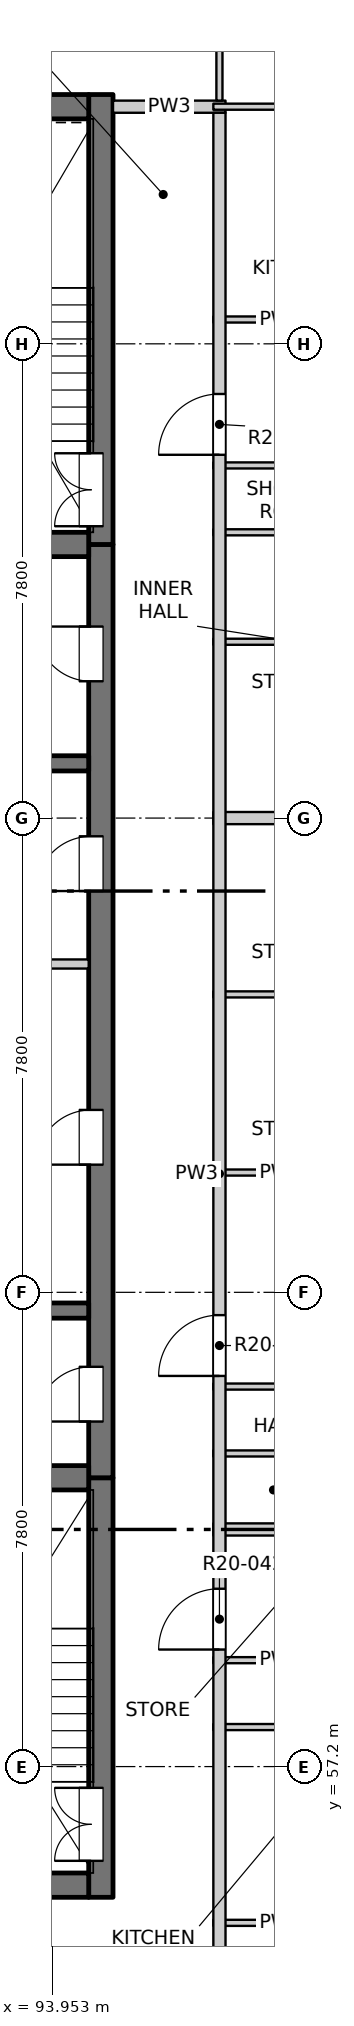
"""IFC4 building model, lengths in metres.
Left out: names, types, materials, properties, quantities, classifications, styles, units other than length and angle.
Written with IfcOpenShell. Run it as: python <this file> out.ifc"""

import sys

from ifc_helpers import new_model, si_unit, direction, frame, frame_2d, origin, place, context, subcontext, project, spatial, rectangle, extrude, element, fill, save


model = new_model("IFC4")
c1 = context("Model", 3, precision=1e-05, world=origin(), true_north=direction((0.0, 1.0)))
c2 = subcontext(c1, "Body", "Model", "MODEL_VIEW")
j1 = project(units=[si_unit("LENGTHUNIT", "METRE"), si_unit("PLANEANGLEUNIT", "RADIAN")], contexts=[c1])
p1 = place(None, origin())
s1 = spatial("IfcSite", under=j1, at=p1, CompositionType="ELEMENT")
p2 = place(p1, origin())
s2 = spatial("IfcBuilding", under=s1, at=p2, CompositionType="ELEMENT")
p3 = place(p2, frame((0.0, 0.0, 210.9)))
s3 = spatial("IfcBuildingStorey", under=s2, at=p3, CompositionType="ELEMENT", Elevation=210.9)
p4 = place(p3, frame((94.75, 55.05, -0.25), z_axis=(0.0, 0.0, 1.0), x_axis=(0.0, 1.0, 0.0)))
e1 = element("IfcWall", 1, at=p4, inside=s3, PredefinedType="SOLIDWALL", context=c2, shape_type="SweptSolid", body=[
    extrude(rectangle(XDim=6.9, YDim=0.4, at=frame_2d((3.45, 0.0))), origin(), (0.0, 0.0, 1.0), 3.4),
])
p5 = place(p4, frame((0.6, 0.0, 0.25)))
e2 = element("IfcOpeningElement", 2, at=p5, cuts=e1, PredefinedType="OPENING", context=c2, shape_type="SweptSolid", body=[
    extrude(rectangle(XDim=1.2, YDim=2.1, at=frame_2d((0.6, 1.05))), frame((0.0, 0.21, 0.0), z_axis=(0.0, -1.0, 0.0), x_axis=(1.0, 0.0, 0.0)), (0.0, 0.0, 1.0), 0.42),
])
p6 = place(p3, frame((94.75, 61.95, -0.25), z_axis=(0.0, 0.0, 1.0), x_axis=(0.0, 1.0, 0.0)))
e3 = element("IfcWall", 3, at=p6, inside=s3, PredefinedType="SOLIDWALL", context=c2, shape_type="SweptSolid", body=[
    extrude(rectangle(XDim=15.35, YDim=0.4, at=frame_2d((7.675, 0.0))), origin(), (0.0, 0.0, 1.0), 3.4),
])
p7 = place(p6, frame((0.925, 0.0, 0.25)))
e4 = element("IfcOpeningElement", 4, at=p7, cuts=e3, PredefinedType="OPENING", context=c2, shape_type="SweptSolid", body=[
    extrude(rectangle(XDim=0.9, YDim=2.1, at=frame_2d((0.45, 1.05))), frame((0.0, 0.21, 0.0), z_axis=(0.0, -1.0, 0.0), x_axis=(1.0, 0.0, 0.0)), (0.0, 0.0, 1.0), 0.42),
])
p8 = place(p6, frame((5.15, 0.0, 0.25)))
e5 = element("IfcOpeningElement", 5, at=p8, cuts=e3, PredefinedType="OPENING", context=c2, shape_type="SweptSolid", body=[
    extrude(rectangle(XDim=0.9, YDim=2.1, at=frame_2d((0.45, 1.05))), frame((0.0, 0.21, 0.0), z_axis=(0.0, -1.0, 0.0), x_axis=(1.0, 0.0, 0.0)), (0.0, 0.0, 1.0), 0.42),
])
p9 = place(p6, frame((9.65, 0.0, 0.25)))
e6 = element("IfcOpeningElement", 6, at=p9, cuts=e3, PredefinedType="OPENING", context=c2, shape_type="SweptSolid", body=[
    extrude(rectangle(XDim=0.9, YDim=2.1, at=frame_2d((0.45, 1.05))), frame((0.0, 0.21, 0.0), z_axis=(0.0, -1.0, 0.0), x_axis=(1.0, 0.0, 0.0)), (0.0, 0.0, 1.0), 0.42),
])
p10 = place(p6, frame((13.1, 0.0, 0.25)))
e7 = element("IfcOpeningElement", 7, at=p10, cuts=e3, PredefinedType="OPENING", context=c2, shape_type="SweptSolid", body=[
    extrude(rectangle(XDim=0.9, YDim=2.1, at=frame_2d((0.45, 1.05))), frame((0.0, 0.21, 0.0), z_axis=(0.0, -1.0, 0.0), x_axis=(1.0, 0.0, 0.0)), (0.0, 0.0, 1.0), 0.42),
])
p11 = place(p3, frame((94.75, 77.3, -0.25), z_axis=(0.0, 0.0, 1.0), x_axis=(0.0, 1.0, 0.0)))
e8 = element("IfcWall", 8, at=p11, inside=s3, PredefinedType="SOLIDWALL", context=c2, shape_type="SweptSolid", body=[
    extrude(rectangle(XDim=7.4, YDim=0.4, at=frame_2d((3.7, 0.0))), origin(), (0.0, 0.0, 1.0), 3.4),
])
p12 = place(p11, frame((0.3, 0.0, 0.25)))
e9 = element("IfcOpeningElement", 9, at=p12, cuts=e8, PredefinedType="OPENING", context=c2, shape_type="SweptSolid", body=[
    extrude(rectangle(XDim=1.2, YDim=2.1, at=frame_2d((0.6, 1.05))), frame((0.0, 0.21, 0.0), z_axis=(0.0, -1.0, 0.0), x_axis=(1.0, 0.0, 0.0)), (0.0, 0.0, 1.0), 0.42),
])
p13 = place(p3, frame((75.45, 55.25, -0.25), z_axis=(0.0, 0.0, 1.0), x_axis=(1.0, 0.0, 0.0)))
e10 = element("IfcWall", 10, at=p13, inside=s3, PredefinedType="SOLIDWALL", context=c2, shape_type="SweptSolid", body=[
    extrude(rectangle(XDim=19.1, YDim=0.4, at=frame_2d((9.55, 0.0))), origin(), (0.0, 0.0, 1.0), 3.4),
])
p14 = place(p13, frame((8.8, 0.0, 0.25)))
e11 = element("IfcOpeningElement", 11, at=p14, cuts=e10, PredefinedType="OPENING", context=c2, shape_type="SweptSolid", body=[
    extrude(rectangle(XDim=1.5, YDim=2.1, at=frame_2d((0.75, 1.05))), frame((0.0, 0.21, 0.0), z_axis=(0.0, -1.0, 0.0), x_axis=(1.0, 0.0, 0.0)), (0.0, 0.0, 1.0), 0.42),
])
p15 = place(p3, frame((75.45, 84.5, -0.25), z_axis=(0.0, 0.0, 1.0), x_axis=(1.0, 0.0, 0.0)))
e12 = element("IfcWall", 12, at=p15, inside=s3, PredefinedType="SOLIDWALL", context=c2, shape_type="SweptSolid", body=[
    extrude(rectangle(XDim=19.1, YDim=0.4, at=frame_2d((9.55, 0.0))), origin(), (0.0, 0.0, 1.0), 3.4),
])
p16 = place(p3, frame((90.675, 61.95, -0.25), z_axis=(0.0, 0.0, 1.0), x_axis=(1.0, 0.0, 0.0)))
e13 = element("IfcWall", 13, at=p16, inside=s3, PredefinedType="SOLIDWALL", context=c2, shape_type="SweptSolid", body=[
    extrude(rectangle(XDim=3.875, YDim=0.4, at=frame_2d((1.938, 0.0))), origin(), (0.0, 0.0, 1.0), 3.4),
])
for number, where, z_axis, x_axis in (
    (14, (90.675, 64.7, -0.25), (0.0, 0.0, 1.0), (1.0, 0.0, 0.0)),
    (15, (90.675, 73.7, -0.25), (0.0, 0.0, 1.0), (1.0, 0.0, 0.0)),
):
    element("IfcWall", number, at=place(p3, frame(where, z_axis=z_axis, x_axis=x_axis)), inside=s3, PredefinedType="SOLIDWALL", context=c2, shape_type="SweptSolid", body=[
        extrude(rectangle(XDim=3.875, YDim=0.25, at=frame_2d((1.938, 0.0))), origin(), (0.0, 0.0, 1.0), 3.4),
    ])
p17 = place(p3, frame((90.675, 77.3, -0.25), z_axis=(0.0, 0.0, 1.0), x_axis=(1.0, 0.0, 0.0)))
e16 = element("IfcWall", 16, at=p17, inside=s3, PredefinedType="SOLIDWALL", context=c2, shape_type="SweptSolid", body=[
    extrude(rectangle(XDim=3.875, YDim=0.4, at=frame_2d((1.938, 0.0))), origin(), (0.0, 0.0, 1.0), 3.4),
])
for number, where, z_axis, x_axis in (
    (17, (96.6, 54.63, 0.0), (0.0, 0.0, 1.0), (1.0, 0.0, 0.0)),
    (18, (96.6, 57.85, 0.0), (0.0, 0.0, 1.0), (1.0, 0.0, 0.0)),
    (19, (96.6, 58.95, 0.0), (0.0, 0.0, 1.0), (1.0, 0.0, 0.0)),
):
    element("IfcWall", number, at=place(p3, frame(where, z_axis=z_axis, x_axis=x_axis)), inside=s3, PredefinedType="PARTITIONING", context=c2, shape_type="SweptSolid", body=[
        extrude(rectangle(XDim=2.22, YDim=0.1, at=frame_2d((1.11, 0.0))), origin(), (0.0, 0.0, 1.0), 3.15),
    ])
p18 = place(p3, frame((96.6, 61.1, 0.0), z_axis=(0.0, 0.0, 1.0), x_axis=(1.0, 0.0, 0.0)))
e20 = element("IfcWall", 20, at=p18, inside=s3, PredefinedType="PARTITIONING", context=c2, shape_type="SweptSolid", body=[
    extrude(rectangle(XDim=11.5, YDim=0.2, at=frame_2d((5.75, 0.0))), origin(), (0.0, 0.0, 1.0), 2.55),
])
for number, where, z_axis, x_axis in (
    (21, (96.6, 62.35, 0.0), (0.0, 0.0, 1.0), (1.0, 0.0, 0.0)),
    (22, (96.6, 63.45, 0.0), (0.0, 0.0, 1.0), (1.0, 0.0, 0.0)),
    (23, (96.6, 66.97, 0.0), (0.0, 0.0, 1.0), (1.0, 0.0, 0.0)),
    (24, (96.6, 69.9, 0.0), (0.0, 0.0, 1.0), (1.0, 0.0, 0.0)),
):
    element("IfcWall", number, at=place(p3, frame(where, z_axis=z_axis, x_axis=x_axis)), inside=s3, PredefinedType="PARTITIONING", context=c2, shape_type="SweptSolid", body=[
        extrude(rectangle(XDim=2.22, YDim=0.1, at=frame_2d((1.11, 0.0))), origin(), (0.0, 0.0, 1.0), 3.15),
    ])
p19 = place(p3, frame((90.675, 70.4, 0.0), z_axis=(0.0, 0.0, 1.0), x_axis=(1.0, 0.0, 0.0)))
e25 = element("IfcWall", 25, at=p19, inside=s3, PredefinedType="PARTITIONING", context=c2, shape_type="SweptSolid", body=[
    extrude(rectangle(XDim=3.875, YDim=0.15, at=frame_2d((1.938, 0.0))), origin(), (0.0, 0.0, 1.0), 3.15),
])
p20 = place(p3, frame((96.6, 72.8, 0.0), z_axis=(0.0, 0.0, 1.0), x_axis=(1.0, 0.0, 0.0)))
e26 = element("IfcWall", 26, at=p20, inside=s3, PredefinedType="PARTITIONING", context=c2, shape_type="SweptSolid", body=[
    extrude(rectangle(XDim=11.5, YDim=0.2, at=frame_2d((5.75, 0.0))), origin(), (0.0, 0.0, 1.0), 3.15),
])
for number, where, z_axis, x_axis in (
    (27, (96.6, 75.7, 0.0), (0.0, 0.0, 1.0), (1.0, 0.0, 0.0)),
    (28, (96.6, 77.5, 0.0), (0.0, 0.0, 1.0), (1.0, 0.0, 0.0)),
    (29, (96.6, 78.6, 0.0), (0.0, 0.0, 1.0), (1.0, 0.0, 0.0)),
    (30, (96.6, 81.0, 0.0), (0.0, 0.0, 1.0), (1.0, 0.0, 0.0)),
):
    element("IfcWall", number, at=place(p3, frame(where, z_axis=z_axis, x_axis=x_axis)), inside=s3, PredefinedType="PARTITIONING", context=c2, shape_type="SweptSolid", body=[
        extrude(rectangle(XDim=2.22, YDim=0.1, at=frame_2d((1.11, 0.0))), origin(), (0.0, 0.0, 1.0), 3.15),
    ])
p21 = place(p3, frame((94.95, 84.5, 0.0), z_axis=(0.0, 0.0, 1.0), x_axis=(1.0, 0.0, 0.0)))
e31 = element("IfcWall", 31, at=p21, inside=s3, PredefinedType="PARTITIONING", context=c2, shape_type="SweptSolid", body=[
    extrude(rectangle(XDim=1.85, YDim=0.2, at=frame_2d((0.925, 0.0))), origin(), (0.0, 0.0, 1.0), 3.15),
])
p22 = place(p3, frame((96.6, 84.5, 0.0), z_axis=(0.0, 0.0, 1.0), x_axis=(1.0, 0.0, 0.0)))
e32 = element("IfcWall", 32, at=p22, inside=s3, PredefinedType="PARTITIONING", context=c2, shape_type="SweptSolid", body=[
    extrude(rectangle(XDim=11.5, YDim=0.1, at=frame_2d((5.75, 0.0))), origin(), (0.0, 0.0, 1.0), 3.15),
])
p23 = place(p22, frame((2.635, 0.0, 0.0)))
e33 = element("IfcOpeningElement", 33, at=p23, cuts=e32, PredefinedType="OPENING", context=c2, shape_type="SweptSolid", body=[
    extrude(rectangle(XDim=0.9, YDim=2.1, at=frame_2d((0.45, 1.05))), frame((0.0, 0.06, 0.0), z_axis=(0.0, -1.0, 0.0), x_axis=(1.0, 0.0, 0.0)), (0.0, 0.0, 1.0), 0.12),
])
p24 = place(p3, frame((96.7, 49.5, 0.0), z_axis=(0.0, 0.0, 1.0), x_axis=(0.0, 1.0, 0.0)))
e34 = element("IfcWall", 34, at=p24, inside=s3, PredefinedType="PARTITIONING", context=c2, shape_type="SweptSolid", body=[
    extrude(rectangle(XDim=34.9, YDim=0.2, at=frame_2d((17.45, 0.0))), origin(), (0.0, 0.0, 1.0), 3.15),
])
p25 = place(p24, frame((9.625, 0.0, 0.0)))
e35 = element("IfcOpeningElement", 35, at=p25, cuts=e34, PredefinedType="OPENING", context=c2, shape_type="SweptSolid", body=[
    extrude(rectangle(XDim=1.0, YDim=2.1, at=frame_2d((0.5, 1.05))), frame((0.0, 0.11, 0.0), z_axis=(0.0, -1.0, 0.0), x_axis=(1.0, 0.0, 0.0)), (0.0, 0.0, 1.0), 0.22),
])
p26 = place(p24, frame((14.125, 0.0, 0.0)))
e36 = element("IfcOpeningElement", 36, at=p26, cuts=e34, PredefinedType="OPENING", context=c2, shape_type="SweptSolid", body=[
    extrude(rectangle(XDim=1.0, YDim=2.1, at=frame_2d((0.5, 1.05))), frame((0.0, 0.11, 0.0), z_axis=(0.0, -1.0, 0.0), x_axis=(1.0, 0.0, 0.0)), (0.0, 0.0, 1.0), 0.22),
])
p27 = place(p24, frame((29.275, 0.0, 0.0)))
e37 = element("IfcOpeningElement", 37, at=p27, cuts=e34, PredefinedType="OPENING", context=c2, shape_type="SweptSolid", body=[
    extrude(rectangle(XDim=1.0, YDim=2.1, at=frame_2d((0.5, 1.05))), frame((0.0, 0.11, 0.0), z_axis=(0.0, -1.0, 0.0), x_axis=(1.0, 0.0, 0.0)), (0.0, 0.0, 1.0), 0.22),
])
p28 = place(p3, frame((96.7, 84.6, 0.0), z_axis=(0.0, 0.0, 1.0), x_axis=(0.0, 1.0, 0.0)))
e38 = element("IfcWall", 38, at=p28, inside=s3, PredefinedType="PARTITIONING", context=c2, shape_type="SweptSolid", body=[
    extrude(rectangle(XDim=3.5, YDim=0.1, at=frame_2d((1.75, 0.0))), origin(), (0.0, 0.0, 1.0), 3.15),
])
p29 = place(p28, frame((1.4, 0.0, 0.0)))
e39 = element("IfcOpeningElement", 39, at=p29, cuts=e38, PredefinedType="OPENING", context=c2, shape_type="SweptSolid", body=[
    extrude(rectangle(XDim=0.9, YDim=2.1, at=frame_2d((0.45, 1.05))), frame((0.0, 0.06, 0.0), z_axis=(0.0, -1.0, 0.0), x_axis=(1.0, 0.0, 0.0)), (0.0, 0.0, 1.0), 0.12),
])
p30 = place(p5, origin())
e40 = element("IfcDoor", 40, at=p30, inside=s3, OperationType="DOUBLE_DOOR_SINGLE_SWING", PredefinedType="DOOR", context=c2, shape_type="SweptSolid", body=[
    extrude(rectangle(XDim=1.2, YDim=2.1, at=frame_2d((0.6, 1.05))), frame((0.0, 0.185, 0.0), z_axis=(0.0, -1.0, 0.0), x_axis=(1.0, 0.0, 0.0)), (0.0, 0.0, 1.0), 0.05),
])
fill(e2, e40)
p31 = place(p25, origin())
e41 = element("IfcDoor", 41, at=p31, inside=s3, OperationType="SINGLE_SWING_LEFT", PredefinedType="DOOR", context=c2, shape_type="SweptSolid", body=[
    extrude(rectangle(XDim=1.0, YDim=2.1, at=frame_2d((0.5, 1.05))), frame((0.0, 0.025, 0.0), z_axis=(0.0, -1.0, 0.0), x_axis=(1.0, 0.0, 0.0)), (0.0, 0.0, 1.0), 0.05),
])
fill(e35, e41)
p32 = place(p7, origin())
e42 = element("IfcDoor", 42, at=p32, inside=s3, OperationType="SINGLE_SWING_LEFT", PredefinedType="DOOR", context=c2, shape_type="SweptSolid", body=[
    extrude(rectangle(XDim=0.9, YDim=2.1, at=frame_2d((0.45, 1.05))), frame((0.0, 0.185, 0.0), z_axis=(0.0, -1.0, 0.0), x_axis=(1.0, 0.0, 0.0)), (0.0, 0.0, 1.0), 0.05),
])
fill(e4, e42)
p33 = place(p26, origin())
e43 = element("IfcDoor", 43, at=p33, inside=s3, OperationType="SINGLE_SWING_LEFT", PredefinedType="DOOR", context=c2, shape_type="SweptSolid", body=[
    extrude(rectangle(XDim=1.0, YDim=2.1, at=frame_2d((0.5, 1.05))), frame((0.0, 0.025, 0.0), z_axis=(0.0, -1.0, 0.0), x_axis=(1.0, 0.0, 0.0)), (0.0, 0.0, 1.0), 0.05),
])
fill(e36, e43)
p34 = place(p8, origin())
e44 = element("IfcDoor", 44, at=p34, inside=s3, OperationType="SINGLE_SWING_LEFT", PredefinedType="DOOR", context=c2, shape_type="SweptSolid", body=[
    extrude(rectangle(XDim=0.9, YDim=2.1, at=frame_2d((0.45, 1.05))), frame((0.0, 0.185, 0.0), z_axis=(0.0, -1.0, 0.0), x_axis=(1.0, 0.0, 0.0)), (0.0, 0.0, 1.0), 0.05),
])
fill(e5, e44)
p35 = place(p9, origin())
e45 = element("IfcDoor", 45, at=p35, inside=s3, OperationType="SINGLE_SWING_LEFT", PredefinedType="DOOR", context=c2, shape_type="SweptSolid", body=[
    extrude(rectangle(XDim=0.9, YDim=2.1, at=frame_2d((0.45, 1.05))), frame((0.0, 0.185, 0.0), z_axis=(0.0, -1.0, 0.0), x_axis=(1.0, 0.0, 0.0)), (0.0, 0.0, 1.0), 0.05),
])
fill(e6, e45)
p36 = place(p10, origin())
e46 = element("IfcDoor", 46, at=p36, inside=s3, OperationType="SINGLE_SWING_RIGHT", PredefinedType="DOOR", context=c2, shape_type="SweptSolid", body=[
    extrude(rectangle(XDim=0.9, YDim=2.1, at=frame_2d((0.45, 1.05))), frame((0.0, 0.185, 0.0), z_axis=(0.0, -1.0, 0.0), x_axis=(1.0, 0.0, 0.0)), (0.0, 0.0, 1.0), 0.05),
])
fill(e7, e46)
p37 = place(p12, origin())
e47 = element("IfcDoor", 47, at=p37, inside=s3, OperationType="DOUBLE_DOOR_SINGLE_SWING", PredefinedType="DOOR", context=c2, shape_type="SweptSolid", body=[
    extrude(rectangle(XDim=1.2, YDim=2.1, at=frame_2d((0.6, 1.05))), frame((0.0, 0.185, 0.0), z_axis=(0.0, -1.0, 0.0), x_axis=(1.0, 0.0, 0.0)), (0.0, 0.0, 1.0), 0.05),
])
fill(e9, e47)
p38 = place(p27, origin())
e48 = element("IfcDoor", 48, at=p38, inside=s3, OperationType="SINGLE_SWING_LEFT", PredefinedType="DOOR", context=c2, shape_type="SweptSolid", body=[
    extrude(rectangle(XDim=1.0, YDim=2.1, at=frame_2d((0.5, 1.05))), frame((0.0, 0.025, 0.0), z_axis=(0.0, -1.0, 0.0), x_axis=(1.0, 0.0, 0.0)), (0.0, 0.0, 1.0), 0.05),
])
fill(e37, e48)
save(model, sys.argv[1])
